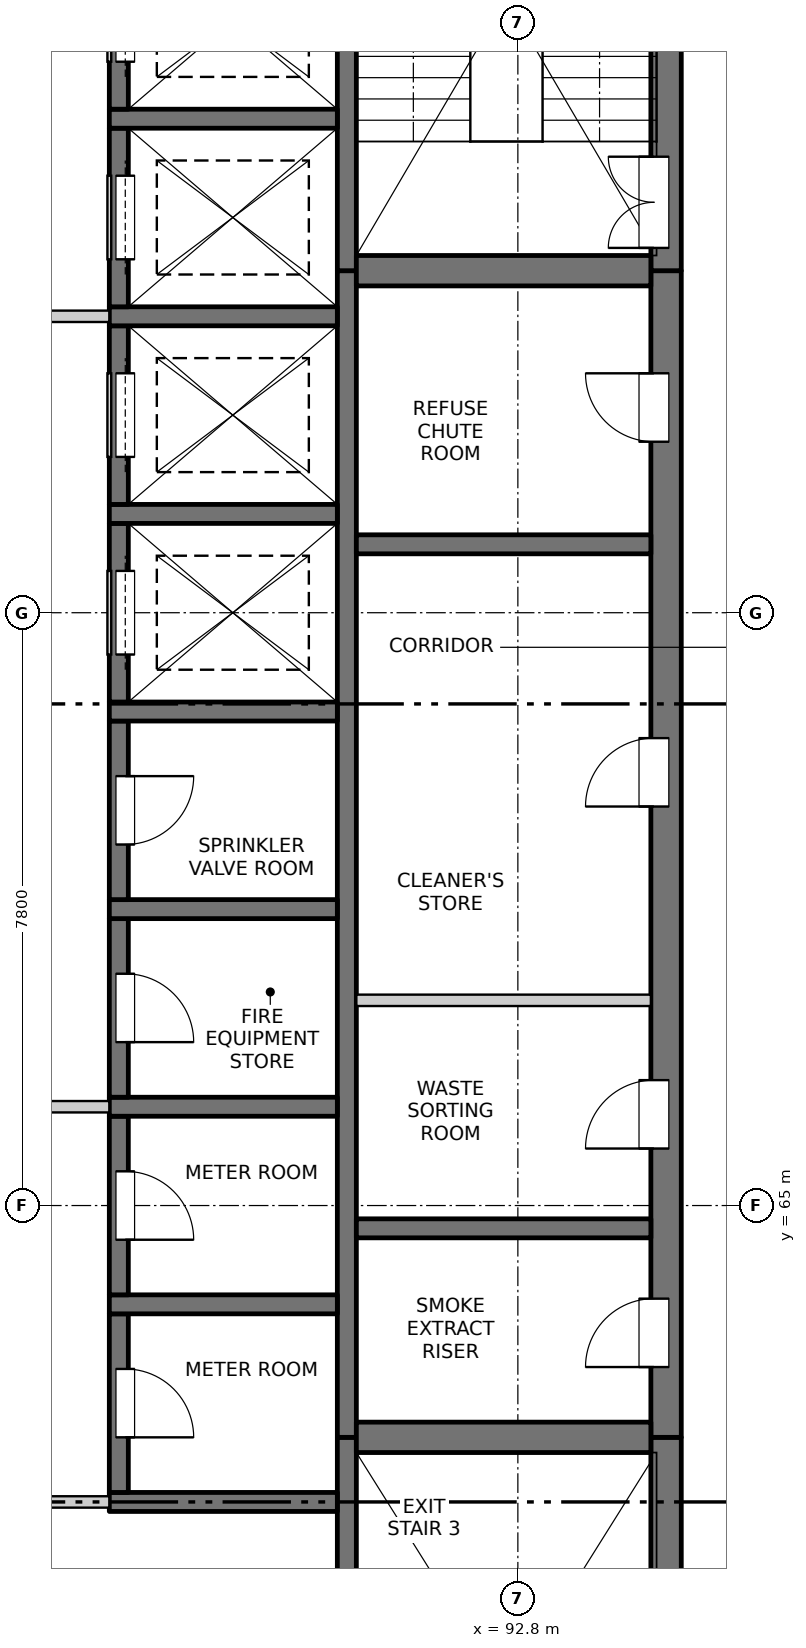
"""IFC4 building model, lengths in metres.
Left out: names, types, materials, properties, quantities, classifications, styles, units other than length and angle.
Written with IfcOpenShell. Run it as: python <this file> out.ifc"""

import sys

from ifc_helpers import new_model, si_unit, direction, frame, frame_2d, origin, place, context, subcontext, project, spatial, rectangle, extrude, element, fill, save


model = new_model("IFC4")
c1 = context("Model", 3, precision=1e-05, world=origin(), true_north=direction((0.0, 1.0)))
c2 = subcontext(c1, "Body", "Model", "MODEL_VIEW")
j1 = project(units=[si_unit("LENGTHUNIT", "METRE"), si_unit("PLANEANGLEUNIT", "RADIAN")], contexts=[c1])
p1 = place(None, origin())
s1 = spatial("IfcSite", under=j1, at=p1, CompositionType="ELEMENT")
p2 = place(p1, origin())
s2 = spatial("IfcBuilding", under=s1, at=p2, CompositionType="ELEMENT")
p3 = place(p2, frame((0.0, 0.0, 259.6)))
s3 = spatial("IfcBuildingStorey", under=s2, at=p3, CompositionType="ELEMENT", Elevation=259.6)
p4 = place(p3, frame((94.75, 55.05, -0.25), z_axis=(0.0, 0.0, 1.0), x_axis=(0.0, 1.0, 0.0)))
e1 = element("IfcWall", 1, at=p4, inside=s3, PredefinedType="SOLIDWALL", context=c2, shape_type="SweptSolid", body=[
    extrude(rectangle(XDim=6.9, YDim=0.4, at=frame_2d((3.45, 0.0))), origin(), (0.0, 0.0, 1.0), 3.4),
])
p5 = place(p4, frame((0.6, 0.0, 0.25)))
e2 = element("IfcOpeningElement", 2, at=p5, cuts=e1, PredefinedType="OPENING", context=c2, shape_type="SweptSolid", body=[
    extrude(rectangle(XDim=1.2, YDim=2.1, at=frame_2d((0.6, 1.05))), frame((0.0, 0.21, 0.0), z_axis=(0.0, -1.0, 0.0), x_axis=(1.0, 0.0, 0.0)), (0.0, 0.0, 1.0), 0.42),
])
p6 = place(p3, frame((94.75, 61.95, -0.25), z_axis=(0.0, 0.0, 1.0), x_axis=(0.0, 1.0, 0.0)))
e3 = element("IfcWall", 3, at=p6, inside=s3, PredefinedType="SOLIDWALL", context=c2, shape_type="SweptSolid", body=[
    extrude(rectangle(XDim=15.35, YDim=0.4, at=frame_2d((7.675, 0.0))), origin(), (0.0, 0.0, 1.0), 3.4),
])
p7 = place(p6, frame((0.925, 0.0, 0.25)))
e4 = element("IfcOpeningElement", 4, at=p7, cuts=e3, PredefinedType="OPENING", context=c2, shape_type="SweptSolid", body=[
    extrude(rectangle(XDim=0.9, YDim=2.1, at=frame_2d((0.45, 1.05))), frame((0.0, 0.21, 0.0), z_axis=(0.0, -1.0, 0.0), x_axis=(1.0, 0.0, 0.0)), (0.0, 0.0, 1.0), 0.42),
])
p8 = place(p6, frame((3.8, 0.0, 0.25)))
e5 = element("IfcOpeningElement", 5, at=p8, cuts=e3, PredefinedType="OPENING", context=c2, shape_type="SweptSolid", body=[
    extrude(rectangle(XDim=0.9, YDim=2.1, at=frame_2d((0.45, 1.05))), frame((0.0, 0.21, 0.0), z_axis=(0.0, -1.0, 0.0), x_axis=(1.0, 0.0, 0.0)), (0.0, 0.0, 1.0), 0.42),
])
p9 = place(p6, frame((8.3, 0.0, 0.25)))
e6 = element("IfcOpeningElement", 6, at=p9, cuts=e3, PredefinedType="OPENING", context=c2, shape_type="SweptSolid", body=[
    extrude(rectangle(XDim=0.9, YDim=2.1, at=frame_2d((0.45, 1.05))), frame((0.0, 0.21, 0.0), z_axis=(0.0, -1.0, 0.0), x_axis=(1.0, 0.0, 0.0)), (0.0, 0.0, 1.0), 0.42),
])
p10 = place(p6, frame((13.1, 0.0, 0.25)))
e7 = element("IfcOpeningElement", 7, at=p10, cuts=e3, PredefinedType="OPENING", context=c2, shape_type="SweptSolid", body=[
    extrude(rectangle(XDim=0.9, YDim=2.1, at=frame_2d((0.45, 1.05))), frame((0.0, 0.21, 0.0), z_axis=(0.0, -1.0, 0.0), x_axis=(1.0, 0.0, 0.0)), (0.0, 0.0, 1.0), 0.42),
])
p11 = place(p3, frame((94.75, 77.3, -0.25), z_axis=(0.0, 0.0, 1.0), x_axis=(0.0, 1.0, 0.0)))
e8 = element("IfcWall", 8, at=p11, inside=s3, PredefinedType="SOLIDWALL", context=c2, shape_type="SweptSolid", body=[
    extrude(rectangle(XDim=7.4, YDim=0.4, at=frame_2d((3.7, 0.0))), origin(), (0.0, 0.0, 1.0), 3.4),
])
p12 = place(p11, frame((0.3, 0.0, 0.25)))
e9 = element("IfcOpeningElement", 9, at=p12, cuts=e8, PredefinedType="OPENING", context=c2, shape_type="SweptSolid", body=[
    extrude(rectangle(XDim=1.2, YDim=2.1, at=frame_2d((0.6, 1.05))), frame((0.0, 0.21, 0.0), z_axis=(0.0, -1.0, 0.0), x_axis=(1.0, 0.0, 0.0)), (0.0, 0.0, 1.0), 0.42),
])
p13 = place(p3, frame((90.55, 55.45, -0.25), z_axis=(0.0, 0.0, 1.0), x_axis=(0.0, 1.0, 0.0)))
e10 = element("IfcWall", 10, at=p13, inside=s3, PredefinedType="SOLIDWALL", context=c2, shape_type="SweptSolid", body=[
    extrude(rectangle(XDim=6.5, YDim=0.25, at=frame_2d((3.25, 0.0))), origin(), (0.0, 0.0, 1.0), 3.4),
])
p14 = place(p3, frame((90.55, 61.95, -0.25), z_axis=(0.0, 0.0, 1.0), x_axis=(0.0, 1.0, 0.0)))
e11 = element("IfcWall", 11, at=p14, inside=s3, PredefinedType="SOLIDWALL", context=c2, shape_type="SweptSolid", body=[
    extrude(rectangle(XDim=15.35, YDim=0.25, at=frame_2d((7.675, 0.0))), origin(), (0.0, 0.0, 1.0), 3.4),
])
p15 = place(p3, frame((90.55, 77.3, -0.25), z_axis=(0.0, 0.0, 1.0), x_axis=(0.0, 1.0, 0.0)))
e12 = element("IfcWall", 12, at=p15, inside=s3, PredefinedType="SOLIDWALL", context=c2, shape_type="SweptSolid", body=[
    extrude(rectangle(XDim=7.0, YDim=0.25, at=frame_2d((3.5, 0.0))), origin(), (0.0, 0.0, 1.0), 3.4),
])
p16 = place(p3, frame((87.425, 61.1, -0.25), z_axis=(0.0, 0.0, 1.0), x_axis=(1.0, 0.0, 0.0)))
e13 = element("IfcWall", 13, at=p16, inside=s3, PredefinedType="SOLIDWALL", context=c2, shape_type="SweptSolid", body=[
    extrude(rectangle(XDim=3.0, YDim=0.25, at=frame_2d((1.5, 0.0))), origin(), (0.0, 0.0, 1.0), 3.4),
])
p17 = place(p3, frame((87.55, 61.225, -0.25), z_axis=(0.0, 0.0, 1.0), x_axis=(0.0, 1.0, 0.0)))
e14 = element("IfcWall", 14, at=p17, inside=s3, PredefinedType="SOLIDWALL", context=c2, shape_type="SweptSolid", body=[
    extrude(rectangle(XDim=2.35, YDim=0.25, at=frame_2d((1.175, 0.0))), origin(), (0.0, 0.0, 1.0), 3.4),
])
p18 = place(p17, frame((0.725, 0.0, 0.25)))
e15 = element("IfcOpeningElement", 15, at=p18, cuts=e14, PredefinedType="OPENING", context=c2, shape_type="SweptSolid", body=[
    extrude(rectangle(XDim=0.9, YDim=2.1, at=frame_2d((0.45, 1.05))), frame((0.0, 0.135, 0.0), z_axis=(0.0, -1.0, 0.0), x_axis=(1.0, 0.0, 0.0)), (0.0, 0.0, 1.0), 0.27),
])
p19 = place(p3, frame((87.425, 63.7, -0.25), z_axis=(0.0, 0.0, 1.0), x_axis=(1.0, 0.0, 0.0)))
e16 = element("IfcWall", 16, at=p19, inside=s3, PredefinedType="SOLIDWALL", context=c2, shape_type="SweptSolid", body=[
    extrude(rectangle(XDim=3.0, YDim=0.25, at=frame_2d((1.5, 0.0))), origin(), (0.0, 0.0, 1.0), 3.4),
])
p20 = place(p3, frame((87.55, 63.825, -0.25), z_axis=(0.0, 0.0, 1.0), x_axis=(0.0, 1.0, 0.0)))
e17 = element("IfcWall", 17, at=p20, inside=s3, PredefinedType="SOLIDWALL", context=c2, shape_type="SweptSolid", body=[
    extrude(rectangle(XDim=2.35, YDim=0.25, at=frame_2d((1.175, 0.0))), origin(), (0.0, 0.0, 1.0), 3.4),
])
p21 = place(p20, frame((0.725, 0.0, 0.25)))
e18 = element("IfcOpeningElement", 18, at=p21, cuts=e17, PredefinedType="OPENING", context=c2, shape_type="SweptSolid", body=[
    extrude(rectangle(XDim=0.9, YDim=2.1, at=frame_2d((0.45, 1.05))), frame((0.0, 0.135, 0.0), z_axis=(0.0, -1.0, 0.0), x_axis=(1.0, 0.0, 0.0)), (0.0, 0.0, 1.0), 0.27),
])
p22 = place(p3, frame((87.425, 66.3, -0.25), z_axis=(0.0, 0.0, 1.0), x_axis=(1.0, 0.0, 0.0)))
e19 = element("IfcWall", 19, at=p22, inside=s3, PredefinedType="SOLIDWALL", context=c2, shape_type="SweptSolid", body=[
    extrude(rectangle(XDim=3.0, YDim=0.25, at=frame_2d((1.5, 0.0))), origin(), (0.0, 0.0, 1.0), 3.4),
])
p23 = place(p3, frame((87.55, 66.425, -0.25), z_axis=(0.0, 0.0, 1.0), x_axis=(0.0, 1.0, 0.0)))
e20 = element("IfcWall", 20, at=p23, inside=s3, PredefinedType="SOLIDWALL", context=c2, shape_type="SweptSolid", body=[
    extrude(rectangle(XDim=2.35, YDim=0.25, at=frame_2d((1.175, 0.0))), origin(), (0.0, 0.0, 1.0), 3.4),
])
p24 = place(p23, frame((0.725, 0.0, 0.25)))
e21 = element("IfcOpeningElement", 21, at=p24, cuts=e20, PredefinedType="OPENING", context=c2, shape_type="SweptSolid", body=[
    extrude(rectangle(XDim=0.9, YDim=2.1, at=frame_2d((0.45, 1.05))), frame((0.0, 0.135, 0.0), z_axis=(0.0, -1.0, 0.0), x_axis=(1.0, 0.0, 0.0)), (0.0, 0.0, 1.0), 0.27),
])
p25 = place(p3, frame((87.425, 68.9, -0.25), z_axis=(0.0, 0.0, 1.0), x_axis=(1.0, 0.0, 0.0)))
e22 = element("IfcWall", 22, at=p25, inside=s3, PredefinedType="SOLIDWALL", context=c2, shape_type="SweptSolid", body=[
    extrude(rectangle(XDim=3.0, YDim=0.25, at=frame_2d((1.5, 0.0))), origin(), (0.0, 0.0, 1.0), 3.4),
])
p26 = place(p3, frame((87.55, 69.025, -0.25), z_axis=(0.0, 0.0, 1.0), x_axis=(0.0, 1.0, 0.0)))
e23 = element("IfcWall", 23, at=p26, inside=s3, PredefinedType="SOLIDWALL", context=c2, shape_type="SweptSolid", body=[
    extrude(rectangle(XDim=2.35, YDim=0.25, at=frame_2d((1.175, 0.0))), origin(), (0.0, 0.0, 1.0), 3.4),
])
p27 = place(p26, frame((0.725, 0.0, 0.25)))
e24 = element("IfcOpeningElement", 24, at=p27, cuts=e23, PredefinedType="OPENING", context=c2, shape_type="SweptSolid", body=[
    extrude(rectangle(XDim=0.9, YDim=2.1, at=frame_2d((0.45, 1.05))), frame((0.0, 0.135, 0.0), z_axis=(0.0, -1.0, 0.0), x_axis=(1.0, 0.0, 0.0)), (0.0, 0.0, 1.0), 0.27),
])
p28 = place(p3, frame((87.425, 71.5, -0.25), z_axis=(0.0, 0.0, 1.0), x_axis=(1.0, 0.0, 0.0)))
e25 = element("IfcWall", 25, at=p28, inside=s3, PredefinedType="SOLIDWALL", context=c2, shape_type="SweptSolid", body=[
    extrude(rectangle(XDim=3.0, YDim=0.25, at=frame_2d((1.5, 0.0))), origin(), (0.0, 0.0, 1.0), 3.4),
])
p29 = place(p3, frame((87.55, 71.625, -0.25), z_axis=(0.0, 0.0, 1.0), x_axis=(0.0, 1.0, 0.0)))
e26 = element("IfcWall", 26, at=p29, inside=s3, PredefinedType="SOLIDWALL", context=c2, shape_type="SweptSolid", body=[
    extrude(rectangle(XDim=2.35, YDim=0.25, at=frame_2d((1.175, 0.0))), origin(), (0.0, 0.0, 1.0), 3.4),
])
p30 = place(p29, frame((0.625, 0.0, 0.25)))
e27 = element("IfcOpeningElement", 27, at=p30, cuts=e26, PredefinedType="OPENING", context=c2, shape_type="SweptSolid", body=[
    extrude(rectangle(XDim=1.1, YDim=2.1, at=frame_2d((0.55, 1.05))), frame((0.0, 0.135, 0.0), z_axis=(0.0, -1.0, 0.0), x_axis=(1.0, 0.0, 0.0)), (0.0, 0.0, 1.0), 0.27),
])
p31 = place(p3, frame((87.425, 74.1, -0.25), z_axis=(0.0, 0.0, 1.0), x_axis=(1.0, 0.0, 0.0)))
e28 = element("IfcWall", 28, at=p31, inside=s3, PredefinedType="SOLIDWALL", context=c2, shape_type="SweptSolid", body=[
    extrude(rectangle(XDim=3.0, YDim=0.25, at=frame_2d((1.5, 0.0))), origin(), (0.0, 0.0, 1.0), 3.4),
])
p32 = place(p3, frame((87.55, 74.225, -0.25), z_axis=(0.0, 0.0, 1.0), x_axis=(0.0, 1.0, 0.0)))
e29 = element("IfcWall", 29, at=p32, inside=s3, PredefinedType="SOLIDWALL", context=c2, shape_type="SweptSolid", body=[
    extrude(rectangle(XDim=2.35, YDim=0.25, at=frame_2d((1.175, 0.0))), origin(), (0.0, 0.0, 1.0), 3.4),
])
p33 = place(p32, frame((0.625, 0.0, 0.25)))
e30 = element("IfcOpeningElement", 30, at=p33, cuts=e29, PredefinedType="OPENING", context=c2, shape_type="SweptSolid", body=[
    extrude(rectangle(XDim=1.1, YDim=2.1, at=frame_2d((0.55, 1.05))), frame((0.0, 0.135, 0.0), z_axis=(0.0, -1.0, 0.0), x_axis=(1.0, 0.0, 0.0)), (0.0, 0.0, 1.0), 0.27),
])
p34 = place(p3, frame((87.425, 76.7, -0.25), z_axis=(0.0, 0.0, 1.0), x_axis=(1.0, 0.0, 0.0)))
e31 = element("IfcWall", 31, at=p34, inside=s3, PredefinedType="SOLIDWALL", context=c2, shape_type="SweptSolid", body=[
    extrude(rectangle(XDim=3.0, YDim=0.25, at=frame_2d((1.5, 0.0))), origin(), (0.0, 0.0, 1.0), 3.4),
])
p35 = place(p3, frame((87.55, 76.825, -0.25), z_axis=(0.0, 0.0, 1.0), x_axis=(0.0, 1.0, 0.0)))
e32 = element("IfcWall", 32, at=p35, inside=s3, PredefinedType="SOLIDWALL", context=c2, shape_type="SweptSolid", body=[
    extrude(rectangle(XDim=2.35, YDim=0.25, at=frame_2d((1.175, 0.0))), origin(), (0.0, 0.0, 1.0), 3.4),
])
p36 = place(p35, frame((0.625, 0.0, 0.25)))
e33 = element("IfcOpeningElement", 33, at=p36, cuts=e32, PredefinedType="OPENING", context=c2, shape_type="SweptSolid", body=[
    extrude(rectangle(XDim=1.1, YDim=2.1, at=frame_2d((0.55, 1.05))), frame((0.0, 0.135, 0.0), z_axis=(0.0, -1.0, 0.0), x_axis=(1.0, 0.0, 0.0)), (0.0, 0.0, 1.0), 0.27),
])
p37 = place(p3, frame((87.425, 79.3, -0.25), z_axis=(0.0, 0.0, 1.0), x_axis=(1.0, 0.0, 0.0)))
e34 = element("IfcWall", 34, at=p37, inside=s3, PredefinedType="SOLIDWALL", context=c2, shape_type="SweptSolid", body=[
    extrude(rectangle(XDim=3.0, YDim=0.25, at=frame_2d((1.5, 0.0))), origin(), (0.0, 0.0, 1.0), 3.4),
])
p38 = place(p3, frame((87.55, 79.425, -0.25), z_axis=(0.0, 0.0, 1.0), x_axis=(0.0, 1.0, 0.0)))
e35 = element("IfcWall", 35, at=p38, inside=s3, PredefinedType="SOLIDWALL", context=c2, shape_type="SweptSolid", body=[
    extrude(rectangle(XDim=2.35, YDim=0.25, at=frame_2d((1.175, 0.0))), origin(), (0.0, 0.0, 1.0), 3.4),
])
p39 = place(p38, frame((0.625, 0.0, 0.25)))
e36 = element("IfcOpeningElement", 36, at=p39, cuts=e35, PredefinedType="OPENING", context=c2, shape_type="SweptSolid", body=[
    extrude(rectangle(XDim=1.1, YDim=2.1, at=frame_2d((0.55, 1.05))), frame((0.0, 0.135, 0.0), z_axis=(0.0, -1.0, 0.0), x_axis=(1.0, 0.0, 0.0)), (0.0, 0.0, 1.0), 0.27),
])
p40 = place(p3, frame((90.675, 61.95, -0.25), z_axis=(0.0, 0.0, 1.0), x_axis=(1.0, 0.0, 0.0)))
e37 = element("IfcWall", 37, at=p40, inside=s3, PredefinedType="SOLIDWALL", context=c2, shape_type="SweptSolid", body=[
    extrude(rectangle(XDim=3.875, YDim=0.4, at=frame_2d((1.938, 0.0))), origin(), (0.0, 0.0, 1.0), 3.4),
])
for number, where, z_axis, x_axis in (
    (38, (90.675, 64.7, -0.25), (0.0, 0.0, 1.0), (1.0, 0.0, 0.0)),
    (39, (90.675, 73.7, -0.25), (0.0, 0.0, 1.0), (1.0, 0.0, 0.0)),
):
    element("IfcWall", number, at=place(p3, frame(where, z_axis=z_axis, x_axis=x_axis)), inside=s3, PredefinedType="SOLIDWALL", context=c2, shape_type="SweptSolid", body=[
        extrude(rectangle(XDim=3.875, YDim=0.25, at=frame_2d((1.938, 0.0))), origin(), (0.0, 0.0, 1.0), 3.4),
    ])
p41 = place(p3, frame((90.675, 77.3, -0.25), z_axis=(0.0, 0.0, 1.0), x_axis=(1.0, 0.0, 0.0)))
e40 = element("IfcWall", 40, at=p41, inside=s3, PredefinedType="SOLIDWALL", context=c2, shape_type="SweptSolid", body=[
    extrude(rectangle(XDim=3.875, YDim=0.4, at=frame_2d((1.938, 0.0))), origin(), (0.0, 0.0, 1.0), 3.4),
])
p42 = place(p3, frame((82.575, 61.1, 0.0), z_axis=(0.0, 0.0, 1.0), x_axis=(1.0, 0.0, 0.0)))
e41 = element("IfcWall", 41, at=p42, inside=s3, PredefinedType="PARTITIONING", context=c2, shape_type="SweptSolid", body=[
    extrude(rectangle(XDim=4.85, YDim=0.15, at=frame_2d((2.425, 0.0))), origin(), (0.0, 0.0, 1.0), 3.15),
])
p43 = place(p42, frame((1.525, 0.0, 0.0)))
e42 = element("IfcOpeningElement", 42, at=p43, cuts=e41, PredefinedType="OPENING", context=c2, shape_type="SweptSolid", body=[
    extrude(rectangle(XDim=1.8, YDim=2.1, at=frame_2d((0.9, 1.05))), frame((0.0, 0.085, 0.0), z_axis=(0.0, -1.0, 0.0), x_axis=(1.0, 0.0, 0.0)), (0.0, 0.0, 1.0), 0.17),
])
p44 = place(p3, frame((82.575, 66.3, 0.0), z_axis=(0.0, 0.0, 1.0), x_axis=(1.0, 0.0, 0.0)))
e43 = element("IfcWall", 43, at=p44, inside=s3, PredefinedType="PARTITIONING", context=c2, shape_type="SweptSolid", body=[
    extrude(rectangle(XDim=4.85, YDim=0.15, at=frame_2d((2.425, 0.0))), origin(), (0.0, 0.0, 1.0), 3.15),
])
p45 = place(p44, frame((1.525, 0.0, 0.0)))
e44 = element("IfcOpeningElement", 44, at=p45, cuts=e43, PredefinedType="OPENING", context=c2, shape_type="SweptSolid", body=[
    extrude(rectangle(XDim=1.8, YDim=2.1, at=frame_2d((0.9, 1.05))), frame((0.0, 0.085, 0.0), z_axis=(0.0, -1.0, 0.0), x_axis=(1.0, 0.0, 0.0)), (0.0, 0.0, 1.0), 0.17),
])
p46 = place(p3, frame((90.675, 67.7, 0.0), z_axis=(0.0, 0.0, 1.0), x_axis=(1.0, 0.0, 0.0)))
e45 = element("IfcWall", 45, at=p46, inside=s3, PredefinedType="PARTITIONING", context=c2, shape_type="SweptSolid", body=[
    extrude(rectangle(XDim=3.875, YDim=0.15, at=frame_2d((1.938, 0.0))), origin(), (0.0, 0.0, 1.0), 3.15),
])
p47 = place(p3, frame((82.575, 76.7, 0.0), z_axis=(0.0, 0.0, 1.0), x_axis=(1.0, 0.0, 0.0)))
e46 = element("IfcWall", 46, at=p47, inside=s3, PredefinedType="PARTITIONING", context=c2, shape_type="SweptSolid", body=[
    extrude(rectangle(XDim=4.85, YDim=0.15, at=frame_2d((2.425, 0.0))), origin(), (0.0, 0.0, 1.0), 3.15),
])
p48 = place(p47, frame((1.525, 0.0, 0.0)))
e47 = element("IfcOpeningElement", 47, at=p48, cuts=e46, PredefinedType="OPENING", context=c2, shape_type="SweptSolid", body=[
    extrude(rectangle(XDim=1.8, YDim=2.1, at=frame_2d((0.9, 1.05))), frame((0.0, 0.085, 0.0), z_axis=(0.0, -1.0, 0.0), x_axis=(1.0, 0.0, 0.0)), (0.0, 0.0, 1.0), 0.17),
])
p49 = place(p18, origin())
e48 = element("IfcDoor", 48, at=p49, inside=s3, OperationType="SINGLE_SWING_RIGHT", PredefinedType="DOOR", context=c2, shape_type="SweptSolid", body=[
    extrude(rectangle(XDim=0.9, YDim=2.1, at=frame_2d((0.45, 1.05))), frame((0.0, -0.06, 0.0), z_axis=(0.0, -1.0, 0.0), x_axis=(1.0, 0.0, 0.0)), (0.0, 0.0, 1.0), 0.05),
])
fill(e15, e48)
p50 = place(p7, origin())
e49 = element("IfcDoor", 49, at=p50, inside=s3, OperationType="SINGLE_SWING_LEFT", PredefinedType="DOOR", context=c2, shape_type="SweptSolid", body=[
    extrude(rectangle(XDim=0.9, YDim=2.1, at=frame_2d((0.45, 1.05))), frame((0.0, 0.185, 0.0), z_axis=(0.0, -1.0, 0.0), x_axis=(1.0, 0.0, 0.0)), (0.0, 0.0, 1.0), 0.05),
])
fill(e4, e49)
p51 = place(p21, origin())
e50 = element("IfcDoor", 50, at=p51, inside=s3, OperationType="SINGLE_SWING_RIGHT", PredefinedType="DOOR", context=c2, shape_type="SweptSolid", body=[
    extrude(rectangle(XDim=0.9, YDim=2.1, at=frame_2d((0.45, 1.05))), frame((0.0, -0.06, 0.0), z_axis=(0.0, -1.0, 0.0), x_axis=(1.0, 0.0, 0.0)), (0.0, 0.0, 1.0), 0.05),
])
fill(e18, e50)
p52 = place(p8, origin())
e51 = element("IfcDoor", 51, at=p52, inside=s3, OperationType="SINGLE_SWING_LEFT", PredefinedType="DOOR", context=c2, shape_type="SweptSolid", body=[
    extrude(rectangle(XDim=0.9, YDim=2.1, at=frame_2d((0.45, 1.05))), frame((0.0, 0.185, 0.0), z_axis=(0.0, -1.0, 0.0), x_axis=(1.0, 0.0, 0.0)), (0.0, 0.0, 1.0), 0.05),
])
fill(e5, e51)
p53 = place(p24, origin())
e52 = element("IfcDoor", 52, at=p53, inside=s3, OperationType="SINGLE_SWING_RIGHT", PredefinedType="DOOR", context=c2, shape_type="SweptSolid", body=[
    extrude(rectangle(XDim=0.9, YDim=2.1, at=frame_2d((0.45, 1.05))), frame((0.0, -0.06, 0.0), z_axis=(0.0, -1.0, 0.0), x_axis=(1.0, 0.0, 0.0)), (0.0, 0.0, 1.0), 0.05),
])
fill(e21, e52)
p54 = place(p27, origin())
e53 = element("IfcDoor", 53, at=p54, inside=s3, OperationType="SINGLE_SWING_LEFT", PredefinedType="DOOR", context=c2, shape_type="SweptSolid", body=[
    extrude(rectangle(XDim=0.9, YDim=2.1, at=frame_2d((0.45, 1.05))), frame((0.0, -0.06, 0.0), z_axis=(0.0, -1.0, 0.0), x_axis=(1.0, 0.0, 0.0)), (0.0, 0.0, 1.0), 0.05),
])
fill(e24, e53)
p55 = place(p9, origin())
e54 = element("IfcDoor", 54, at=p55, inside=s3, OperationType="SINGLE_SWING_LEFT", PredefinedType="DOOR", context=c2, shape_type="SweptSolid", body=[
    extrude(rectangle(XDim=0.9, YDim=2.1, at=frame_2d((0.45, 1.05))), frame((0.0, 0.185, 0.0), z_axis=(0.0, -1.0, 0.0), x_axis=(1.0, 0.0, 0.0)), (0.0, 0.0, 1.0), 0.05),
])
fill(e6, e54)
p56 = place(p30, origin())
e55 = element("IfcDoor", 55, at=p56, inside=s3, OperationType="SLIDING_TO_LEFT", PredefinedType="DOOR", context=c2, shape_type="SweptSolid", body=[
    extrude(rectangle(XDim=1.1, YDim=2.1, at=frame_2d((0.55, 1.05))), frame((0.0, -0.06, 0.0), z_axis=(0.0, -1.0, 0.0), x_axis=(1.0, 0.0, 0.0)), (0.0, 0.0, 1.0), 0.05),
])
fill(e27, e55)
p57 = place(p33, origin())
e56 = element("IfcDoor", 56, at=p57, inside=s3, OperationType="SLIDING_TO_LEFT", PredefinedType="DOOR", context=c2, shape_type="SweptSolid", body=[
    extrude(rectangle(XDim=1.1, YDim=2.1, at=frame_2d((0.55, 1.05))), frame((0.0, -0.06, 0.0), z_axis=(0.0, -1.0, 0.0), x_axis=(1.0, 0.0, 0.0)), (0.0, 0.0, 1.0), 0.05),
])
fill(e30, e56)
p58 = place(p10, origin())
e57 = element("IfcDoor", 57, at=p58, inside=s3, OperationType="SINGLE_SWING_RIGHT", PredefinedType="DOOR", context=c2, shape_type="SweptSolid", body=[
    extrude(rectangle(XDim=0.9, YDim=2.1, at=frame_2d((0.45, 1.05))), frame((0.0, 0.185, 0.0), z_axis=(0.0, -1.0, 0.0), x_axis=(1.0, 0.0, 0.0)), (0.0, 0.0, 1.0), 0.05),
])
fill(e7, e57)
p59 = place(p36, origin())
e58 = element("IfcDoor", 58, at=p59, inside=s3, OperationType="SLIDING_TO_LEFT", PredefinedType="DOOR", context=c2, shape_type="SweptSolid", body=[
    extrude(rectangle(XDim=1.1, YDim=2.1, at=frame_2d((0.55, 1.05))), frame((0.0, -0.06, 0.0), z_axis=(0.0, -1.0, 0.0), x_axis=(1.0, 0.0, 0.0)), (0.0, 0.0, 1.0), 0.05),
])
fill(e33, e58)
p60 = place(p12, origin())
e59 = element("IfcDoor", 59, at=p60, inside=s3, OperationType="DOUBLE_DOOR_SINGLE_SWING", PredefinedType="DOOR", context=c2, shape_type="SweptSolid", body=[
    extrude(rectangle(XDim=1.2, YDim=2.1, at=frame_2d((0.6, 1.05))), frame((0.0, 0.185, 0.0), z_axis=(0.0, -1.0, 0.0), x_axis=(1.0, 0.0, 0.0)), (0.0, 0.0, 1.0), 0.05),
])
fill(e9, e59)
p61 = place(p39, origin())
e60 = element("IfcDoor", 60, at=p61, inside=s3, OperationType="SLIDING_TO_RIGHT", PredefinedType="DOOR", context=c2, shape_type="SweptSolid", body=[
    extrude(rectangle(XDim=1.1, YDim=2.1, at=frame_2d((0.55, 1.05))), frame((0.0, -0.06, 0.0), z_axis=(0.0, -1.0, 0.0), x_axis=(1.0, 0.0, 0.0)), (0.0, 0.0, 1.0), 0.05),
])
fill(e36, e60)
save(model, sys.argv[1])
